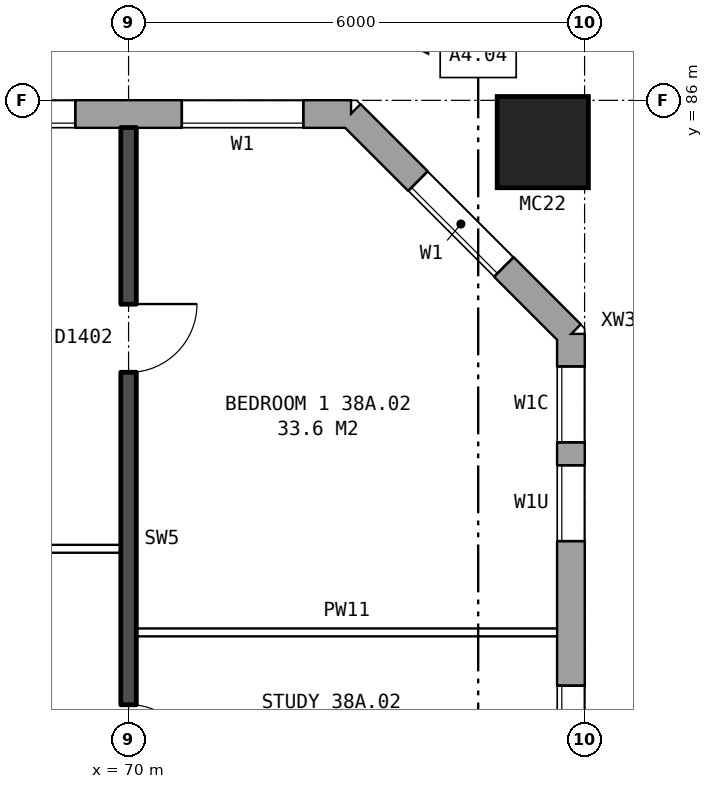
"""IFC4 building model, lengths in metres.
Left out: names, types, materials, properties, quantities, classifications, styles, units other than length and angle.
Written with IfcOpenShell. Run it as: python <this file> out.ifc"""

import sys

from ifc_helpers import new_model, si_unit, direction, frame, frame_2d, origin, origin_2d, place, context, subcontext, project, spatial, rectangle, hollow_rectangle, extrude, element, fill, save


model = new_model("IFC4")
c1 = context("Model", 3, precision=1e-05, world=origin(), true_north=direction((0.0, 1.0)))
c2 = subcontext(c1, "Body", "Model", "MODEL_VIEW")
j1 = project(units=[si_unit("LENGTHUNIT", "METRE"), si_unit("PLANEANGLEUNIT", "RADIAN")], contexts=[c1])
p1 = place(None, origin())
s1 = spatial("IfcSite", under=j1, at=p1, CompositionType="ELEMENT")
p2 = place(p1, origin())
s2 = spatial("IfcBuilding", under=s1, at=p2, CompositionType="ELEMENT")
p3 = place(p2, frame((0.0, 0.0, 136.1)))
s3 = spatial("IfcBuildingStorey", under=s2, at=p3, CompositionType="ELEMENT", Elevation=136.1)
p4 = place(p3, frame((75.45, 85.45, 0.0), z_axis=(0.0, 0.0, 1.0), x_axis=(1.0, 0.0, 0.0)))
e1 = element("IfcColumn", 1, at=p4, inside=s3, PredefinedType="COLUMN", context=c2, shape_type="SweptSolid", body=[
    extrude(hollow_rectangle(XDim=1.2, YDim=1.2, WallThickness=0.065, at=origin_2d()), origin(), (0.0, 0.0, 1.0), 3.1),
])
p5 = place(p3, frame((75.82, 57.075, 0.0), z_axis=(0.0, 0.0, 1.0), x_axis=(0.0, 1.0, 0.0)))
e2 = element("IfcWall", 2, at=p5, inside=s3, PredefinedType="STANDARD", context=c2, shape_type="SweptSolid", body=[
    extrude(rectangle(XDim=25.851, YDim=0.36, at=frame_2d((12.925, 0.0))), origin(), (0.0, 0.0, 1.0), 2.85),
])
p6 = place(p5, frame((1.075, 0.0, 0.8)))
e3 = element("IfcOpeningElement", 3, at=p6, cuts=e2, PredefinedType="OPENING", context=c2, shape_type="SweptSolid", body=[
    extrude(rectangle(XDim=1.2, YDim=1.2, at=frame_2d((0.6, 0.6))), frame((0.0, 0.19, 0.0), z_axis=(0.0, -1.0, 0.0), x_axis=(1.0, 0.0, 0.0)), (0.0, 0.0, 1.0), 0.38),
])
p7 = place(p5, frame((4.625, 0.0, 0.8)))
e4 = element("IfcOpeningElement", 4, at=p7, cuts=e2, PredefinedType="OPENING", context=c2, shape_type="SweptSolid", body=[
    extrude(rectangle(XDim=1.6, YDim=1.8, at=frame_2d((0.8, 0.9))), frame((0.0, 0.19, 0.0), z_axis=(0.0, -1.0, 0.0), x_axis=(1.0, 0.0, 0.0)), (0.0, 0.0, 1.0), 0.38),
])
p8 = place(p5, frame((19.625, 0.0, 0.8)))
e5 = element("IfcOpeningElement", 5, at=p8, cuts=e2, PredefinedType="OPENING", context=c2, shape_type="SweptSolid", body=[
    extrude(rectangle(XDim=1.6, YDim=1.8, at=frame_2d((0.8, 0.9))), frame((0.0, 0.19, 0.0), z_axis=(0.0, -1.0, 0.0), x_axis=(1.0, 0.0, 0.0)), (0.0, 0.0, 1.0), 0.38),
])
p9 = place(p5, frame((23.125, 0.0, 0.8)))
e6 = element("IfcOpeningElement", 6, at=p9, cuts=e2, PredefinedType="OPENING", context=c2, shape_type="SweptSolid", body=[
    extrude(rectangle(XDim=1.0, YDim=0.9, at=frame_2d((0.5, 0.45))), frame((0.0, 0.19, 0.0), z_axis=(0.0, -1.0, 0.0), x_axis=(1.0, 0.0, 0.0)), (0.0, 0.0, 1.0), 0.38),
])
p10 = place(p5, frame((3.675, 0.0, 1.7)))
e7 = element("IfcOpeningElement", 7, at=p10, cuts=e2, PredefinedType="OPENING", context=c2, shape_type="SweptSolid", body=[
    extrude(rectangle(XDim=0.6, YDim=0.9, at=frame_2d((0.3, 0.45))), frame((0.0, 0.19, 0.0), z_axis=(0.0, -1.0, 0.0), x_axis=(1.0, 0.0, 0.0)), (0.0, 0.0, 1.0), 0.38),
])
p11 = place(p5, frame((24.425, 0.0, 0.8)))
e8 = element("IfcOpeningElement", 8, at=p11, cuts=e2, PredefinedType="OPENING", context=c2, shape_type="SweptSolid", body=[
    extrude(rectangle(XDim=1.0, YDim=1.8, at=frame_2d((0.5, 0.9))), frame((0.0, 0.19, 0.0), z_axis=(0.0, -1.0, 0.0), x_axis=(1.0, 0.0, 0.0)), (0.0, 0.0, 1.0), 0.38),
])
p12 = place(p3, frame((75.82, 82.925, 0.0), z_axis=(0.0, 0.0, 1.0), x_axis=(-0.707106781187, 0.707106781187, 0.0)))
e9 = element("IfcWall", 9, at=p12, inside=s3, PredefinedType="STANDARD", context=c2, shape_type="SweptSolid", body=[
    extrude(rectangle(XDim=4.094, YDim=0.36, at=frame_2d((2.047, 0.0))), origin(), (0.0, 0.0, 1.0), 2.85),
])
p13 = place(p12, frame((1.247, 0.0, 0.8)))
e10 = element("IfcOpeningElement", 10, at=p13, cuts=e9, PredefinedType="OPENING", context=c2, shape_type="SweptSolid", body=[
    extrude(rectangle(XDim=1.6, YDim=1.8, at=frame_2d((0.8, 0.9))), frame((0.0, 0.19, 0.0), z_axis=(0.0, -1.0, 0.0), x_axis=(1.0, 0.0, 0.0)), (0.0, 0.0, 1.0), 0.38),
])
p14 = place(p3, frame((72.925, 85.82, 0.0), z_axis=(0.0, 0.0, 1.0), x_axis=(-1.0, 0.0, 0.0)))
e11 = element("IfcWall", 11, at=p14, inside=s3, PredefinedType="STANDARD", context=c2, shape_type="SweptSolid", body=[
    extrude(rectangle(XDim=43.101, YDim=0.36, at=frame_2d((21.55, 0.0))), origin(), (0.0, 0.0, 1.0), 2.85),
])
p15 = place(p14, frame((0.625, 0.0, 0.8)))
e12 = element("IfcOpeningElement", 12, at=p15, cuts=e11, PredefinedType="OPENING", context=c2, shape_type="SweptSolid", body=[
    extrude(rectangle(XDim=1.6, YDim=1.8, at=frame_2d((0.8, 0.9))), frame((0.0, 0.19, 0.0), z_axis=(0.0, -1.0, 0.0), x_axis=(1.0, 0.0, 0.0)), (0.0, 0.0, 1.0), 0.38),
])
p16 = place(p14, frame((3.625, 0.0, 0.8)))
e13 = element("IfcOpeningElement", 13, at=p16, cuts=e11, PredefinedType="OPENING", context=c2, shape_type="SweptSolid", body=[
    extrude(rectangle(XDim=1.6, YDim=1.8, at=frame_2d((0.8, 0.9))), frame((0.0, 0.19, 0.0), z_axis=(0.0, -1.0, 0.0), x_axis=(1.0, 0.0, 0.0)), (0.0, 0.0, 1.0), 0.38),
])
p17 = place(p14, frame((6.625, 0.0, 0.8)))
e14 = element("IfcOpeningElement", 14, at=p17, cuts=e11, PredefinedType="OPENING", context=c2, shape_type="SweptSolid", body=[
    extrude(rectangle(XDim=1.6, YDim=1.8, at=frame_2d((0.8, 0.9))), frame((0.0, 0.19, 0.0), z_axis=(0.0, -1.0, 0.0), x_axis=(1.0, 0.0, 0.0)), (0.0, 0.0, 1.0), 0.38),
])
p18 = place(p14, frame((9.625, 0.0, 0.8)))
e15 = element("IfcOpeningElement", 15, at=p18, cuts=e11, PredefinedType="OPENING", context=c2, shape_type="SweptSolid", body=[
    extrude(rectangle(XDim=1.6, YDim=1.8, at=frame_2d((0.8, 0.9))), frame((0.0, 0.19, 0.0), z_axis=(0.0, -1.0, 0.0), x_axis=(1.0, 0.0, 0.0)), (0.0, 0.0, 1.0), 0.38),
])
p19 = place(p14, frame((12.625, 0.0, 0.8)))
e16 = element("IfcOpeningElement", 16, at=p19, cuts=e11, PredefinedType="OPENING", context=c2, shape_type="SweptSolid", body=[
    extrude(rectangle(XDim=1.6, YDim=1.8, at=frame_2d((0.8, 0.9))), frame((0.0, 0.19, 0.0), z_axis=(0.0, -1.0, 0.0), x_axis=(1.0, 0.0, 0.0)), (0.0, 0.0, 1.0), 0.38),
])
p20 = place(p14, frame((15.125, 0.0, 1.35)))
e17 = element("IfcOpeningElement", 17, at=p20, cuts=e11, PredefinedType="OPENING", context=c2, shape_type="SweptSolid", body=[
    extrude(rectangle(XDim=1.0, YDim=1.2, at=frame_2d((0.5, 0.6))), frame((0.0, 0.19, 0.0), z_axis=(0.0, -1.0, 0.0), x_axis=(1.0, 0.0, 0.0)), (0.0, 0.0, 1.0), 0.38),
])
p21 = place(p14, frame((18.625, 0.0, 0.8)))
e18 = element("IfcOpeningElement", 18, at=p21, cuts=e11, PredefinedType="OPENING", context=c2, shape_type="SweptSolid", body=[
    extrude(rectangle(XDim=1.6, YDim=1.8, at=frame_2d((0.8, 0.9))), frame((0.0, 0.19, 0.0), z_axis=(0.0, -1.0, 0.0), x_axis=(1.0, 0.0, 0.0)), (0.0, 0.0, 1.0), 0.38),
])
p22 = place(p14, frame((21.625, 0.0, 0.8)))
e19 = element("IfcOpeningElement", 19, at=p22, cuts=e11, PredefinedType="OPENING", context=c2, shape_type="SweptSolid", body=[
    extrude(rectangle(XDim=1.6, YDim=1.8, at=frame_2d((0.8, 0.9))), frame((0.0, 0.19, 0.0), z_axis=(0.0, -1.0, 0.0), x_axis=(1.0, 0.0, 0.0)), (0.0, 0.0, 1.0), 0.38),
])
p23 = place(p14, frame((24.075, 0.0, 0.35)))
e20 = element("IfcOpeningElement", 20, at=p23, cuts=e11, PredefinedType="OPENING", context=c2, shape_type="SweptSolid", body=[
    extrude(rectangle(XDim=0.8, YDim=1.8, at=frame_2d((0.4, 0.9))), frame((0.0, 0.19, 0.0), z_axis=(0.0, -1.0, 0.0), x_axis=(1.0, 0.0, 0.0)), (0.0, 0.0, 1.0), 0.38),
])
p24 = place(p14, frame((27.625, 0.0, 0.8)))
e21 = element("IfcOpeningElement", 21, at=p24, cuts=e11, PredefinedType="OPENING", context=c2, shape_type="SweptSolid", body=[
    extrude(rectangle(XDim=1.6, YDim=1.8, at=frame_2d((0.8, 0.9))), frame((0.0, 0.19, 0.0), z_axis=(0.0, -1.0, 0.0), x_axis=(1.0, 0.0, 0.0)), (0.0, 0.0, 1.0), 0.38),
])
p25 = place(p14, frame((30.625, 0.0, 0.8)))
e22 = element("IfcOpeningElement", 22, at=p25, cuts=e11, PredefinedType="OPENING", context=c2, shape_type="SweptSolid", body=[
    extrude(rectangle(XDim=1.6, YDim=1.8, at=frame_2d((0.8, 0.9))), frame((0.0, 0.19, 0.0), z_axis=(0.0, -1.0, 0.0), x_axis=(1.0, 0.0, 0.0)), (0.0, 0.0, 1.0), 0.38),
])
p26 = place(p14, frame((33.625, 0.0, 0.8)))
e23 = element("IfcOpeningElement", 23, at=p26, cuts=e11, PredefinedType="OPENING", context=c2, shape_type="SweptSolid", body=[
    extrude(rectangle(XDim=1.6, YDim=1.8, at=frame_2d((0.8, 0.9))), frame((0.0, 0.19, 0.0), z_axis=(0.0, -1.0, 0.0), x_axis=(1.0, 0.0, 0.0)), (0.0, 0.0, 1.0), 0.38),
])
p27 = place(p14, frame((36.625, 0.0, 0.8)))
e24 = element("IfcOpeningElement", 24, at=p27, cuts=e11, PredefinedType="OPENING", context=c2, shape_type="SweptSolid", body=[
    extrude(rectangle(XDim=1.6, YDim=1.8, at=frame_2d((0.8, 0.9))), frame((0.0, 0.19, 0.0), z_axis=(0.0, -1.0, 0.0), x_axis=(1.0, 0.0, 0.0)), (0.0, 0.0, 1.0), 0.38),
])
p28 = place(p14, frame((39.625, 0.0, 0.8)))
e25 = element("IfcOpeningElement", 25, at=p28, cuts=e11, PredefinedType="OPENING", context=c2, shape_type="SweptSolid", body=[
    extrude(rectangle(XDim=1.6, YDim=1.8, at=frame_2d((0.8, 0.9))), frame((0.0, 0.19, 0.0), z_axis=(0.0, -1.0, 0.0), x_axis=(1.0, 0.0, 0.0)), (0.0, 0.0, 1.0), 0.38),
])
p29 = place(p14, frame((16.975, 0.0, 0.15)))
e26 = element("IfcOpeningElement", 26, at=p29, cuts=e11, PredefinedType="OPENING", context=c2, shape_type="SweptSolid", body=[
    extrude(rectangle(XDim=0.8, YDim=0.9, at=frame_2d((0.4, 0.45))), frame((0.0, 0.19, 0.0), z_axis=(0.0, -1.0, 0.0), x_axis=(1.0, 0.0, 0.0)), (0.0, 0.0, 1.0), 0.38),
])
p30 = place(p14, frame((25.175, 0.0, 0.25)))
e27 = element("IfcOpeningElement", 27, at=p30, cuts=e11, PredefinedType="OPENING", context=c2, shape_type="SweptSolid", body=[
    extrude(rectangle(XDim=0.8, YDim=0.9, at=frame_2d((0.4, 0.45))), frame((0.0, 0.19, 0.0), z_axis=(0.0, -1.0, 0.0), x_axis=(1.0, 0.0, 0.0)), (0.0, 0.0, 1.0), 0.38),
])
p31 = place(p3, frame((70.1, 79.0, 0.0), z_axis=(0.0, 0.0, 1.0), x_axis=(1.0, 0.0, 0.0)))
e28 = element("IfcWall", 28, at=p31, inside=s3, PredefinedType="PARTITIONING", context=c2, shape_type="SweptSolid", body=[
    extrude(rectangle(XDim=5.54, YDim=0.1, at=frame_2d((2.77, 0.0))), origin(), (0.0, 0.0, 1.0), 2.85),
])
p32 = place(p3, frame((64.1, 80.1, 0.0), z_axis=(0.0, 0.0, 1.0), x_axis=(1.0, 0.0, 0.0)))
e29 = element("IfcWall", 29, at=p32, inside=s3, PredefinedType="PARTITIONING", context=c2, shape_type="SweptSolid", body=[
    extrude(rectangle(XDim=5.8, YDim=0.1, at=frame_2d((2.9, 0.0))), origin(), (0.0, 0.0, 1.0), 2.85),
])
p33 = place(p32, frame((3.6, 0.0, 0.0)))
e30 = element("IfcOpeningElement", 30, at=p33, cuts=e29, PredefinedType="OPENING", context=c2, shape_type="SweptSolid", body=[
    extrude(rectangle(XDim=0.9, YDim=2.1, at=frame_2d((0.45, 1.05))), frame((0.0, 0.06, 0.0), z_axis=(0.0, -1.0, 0.0), x_axis=(1.0, 0.0, 0.0)), (0.0, 0.0, 1.0), 0.12),
])
p34 = place(p32, frame((0.7, 0.0, 0.0)))
e31 = element("IfcOpeningElement", 31, at=p34, cuts=e29, PredefinedType="OPENING", context=c2, shape_type="SweptSolid", body=[
    extrude(rectangle(XDim=0.9, YDim=2.1, at=frame_2d((0.45, 1.05))), frame((0.0, 0.06, 0.0), z_axis=(0.0, -1.0, 0.0), x_axis=(1.0, 0.0, 0.0)), (0.0, 0.0, 1.0), 0.12),
])
p35 = place(p3, frame((70.0, 76.2, 0.0), z_axis=(0.0, 0.0, 1.0), x_axis=(0.0, 1.0, 0.0)))
e32 = element("IfcWall", 32, at=p35, inside=s3, PredefinedType="SOLIDWALL", context=c2, shape_type="SweptSolid", body=[
    extrude(rectangle(XDim=9.44, YDim=0.2, at=frame_2d((4.72, 0.0))), origin(), (0.0, 0.0, 1.0), 2.85),
])
p36 = place(p35, frame((6.22, 0.0, 0.0)))
e33 = element("IfcOpeningElement", 33, at=p36, cuts=e32, PredefinedType="OPENING", context=c2, shape_type="SweptSolid", body=[
    extrude(rectangle(XDim=0.9, YDim=2.1, at=frame_2d((0.45, 1.05))), frame((0.0, 0.11, 0.0), z_axis=(0.0, -1.0, 0.0), x_axis=(1.0, 0.0, 0.0)), (0.0, 0.0, 1.0), 0.22),
])
p37 = place(p35, frame((0.95, 0.0, 0.0)))
e34 = element("IfcOpeningElement", 34, at=p37, cuts=e32, PredefinedType="OPENING", context=c2, shape_type="SweptSolid", body=[
    extrude(rectangle(XDim=0.9, YDim=2.1, at=frame_2d((0.45, 1.05))), frame((0.0, 0.11, 0.0), z_axis=(0.0, -1.0, 0.0), x_axis=(1.0, 0.0, 0.0)), (0.0, 0.0, 1.0), 0.22),
])
p38 = place(p8, origin())
e35 = element("IfcWindow", 35, at=p38, inside=s3, PartitioningType="SINGLE_PANEL", PredefinedType="WINDOW", context=c2, shape_type="SweptSolid", body=[
    extrude(rectangle(XDim=1.6, YDim=1.8, at=frame_2d((0.8, 0.9))), frame((0.0, 0.15, 0.0), z_axis=(0.0, -1.0, 0.0), x_axis=(1.0, 0.0, 0.0)), (0.0, 0.0, 1.0), 0.06),
])
fill(e5, e35)
p39 = place(p9, origin())
e36 = element("IfcWindow", 36, at=p39, inside=s3, PartitioningType="SINGLE_PANEL", PredefinedType="WINDOW", context=c2, shape_type="SweptSolid", body=[
    extrude(rectangle(XDim=1.0, YDim=0.9, at=frame_2d((0.5, 0.45))), frame((0.0, 0.15, 0.0), z_axis=(0.0, -1.0, 0.0), x_axis=(1.0, 0.0, 0.0)), (0.0, 0.0, 1.0), 0.06),
])
fill(e6, e36)
p40 = place(p13, origin())
e37 = element("IfcWindow", 37, at=p40, inside=s3, PartitioningType="SINGLE_PANEL", PredefinedType="WINDOW", context=c2, shape_type="SweptSolid", body=[
    extrude(rectangle(XDim=1.6, YDim=1.8, at=frame_2d((0.8, 0.9))), frame((0.0, 0.15, 0.0), z_axis=(0.0, -1.0, 0.0), x_axis=(1.0, 0.0, 0.0)), (0.0, 0.0, 1.0), 0.06),
])
fill(e10, e37)
p41 = place(p15, origin())
e38 = element("IfcWindow", 38, at=p41, inside=s3, PartitioningType="SINGLE_PANEL", PredefinedType="WINDOW", context=c2, shape_type="SweptSolid", body=[
    extrude(rectangle(XDim=1.6, YDim=1.8, at=frame_2d((0.8, 0.9))), frame((0.0, 0.15, 0.0), z_axis=(0.0, -1.0, 0.0), x_axis=(1.0, 0.0, 0.0)), (0.0, 0.0, 1.0), 0.06),
])
fill(e12, e38)
p42 = place(p16, origin())
e39 = element("IfcWindow", 39, at=p42, inside=s3, PartitioningType="SINGLE_PANEL", PredefinedType="WINDOW", context=c2, shape_type="SweptSolid", body=[
    extrude(rectangle(XDim=1.6, YDim=1.8, at=frame_2d((0.8, 0.9))), frame((0.0, 0.15, 0.0), z_axis=(0.0, -1.0, 0.0), x_axis=(1.0, 0.0, 0.0)), (0.0, 0.0, 1.0), 0.06),
])
fill(e13, e39)
p43 = place(p36, frame((0.9, 0.0, 0.0), z_axis=(0.0, 0.0, 1.0), x_axis=(-1.0, 0.0, 0.0)))
e40 = element("IfcDoor", 40, at=p43, inside=s3, OperationType="SINGLE_SWING_LEFT", PredefinedType="DOOR", context=c2, shape_type="SweptSolid", body=[
    extrude(rectangle(XDim=0.9, YDim=2.1, at=frame_2d((0.45, 1.05))), frame((0.0, 0.025, 0.0), z_axis=(0.0, -1.0, 0.0), x_axis=(1.0, 0.0, 0.0)), (0.0, 0.0, 1.0), 0.05),
])
fill(e33, e40)
p44 = place(p37, frame((0.9, 0.0, 0.0), z_axis=(0.0, 0.0, 1.0), x_axis=(-1.0, 0.0, 0.0)))
e41 = element("IfcDoor", 41, at=p44, inside=s3, OperationType="SINGLE_SWING_RIGHT", PredefinedType="DOOR", context=c2, shape_type="SweptSolid", body=[
    extrude(rectangle(XDim=0.9, YDim=2.1, at=frame_2d((0.45, 1.05))), frame((0.0, 0.025, 0.0), z_axis=(0.0, -1.0, 0.0), x_axis=(1.0, 0.0, 0.0)), (0.0, 0.0, 1.0), 0.05),
])
fill(e34, e41)
p45 = place(p11, origin())
e42 = element("IfcWindow", 42, at=p45, inside=s3, PartitioningType="SINGLE_PANEL", PredefinedType="WINDOW", context=c2, shape_type="SweptSolid", body=[
    extrude(rectangle(XDim=1.0, YDim=1.8, at=frame_2d((0.5, 0.9))), frame((0.0, 0.15, 0.0), z_axis=(0.0, -1.0, 0.0), x_axis=(1.0, 0.0, 0.0)), (0.0, 0.0, 1.0), 0.06),
])
fill(e8, e42)
save(model, sys.argv[1])
